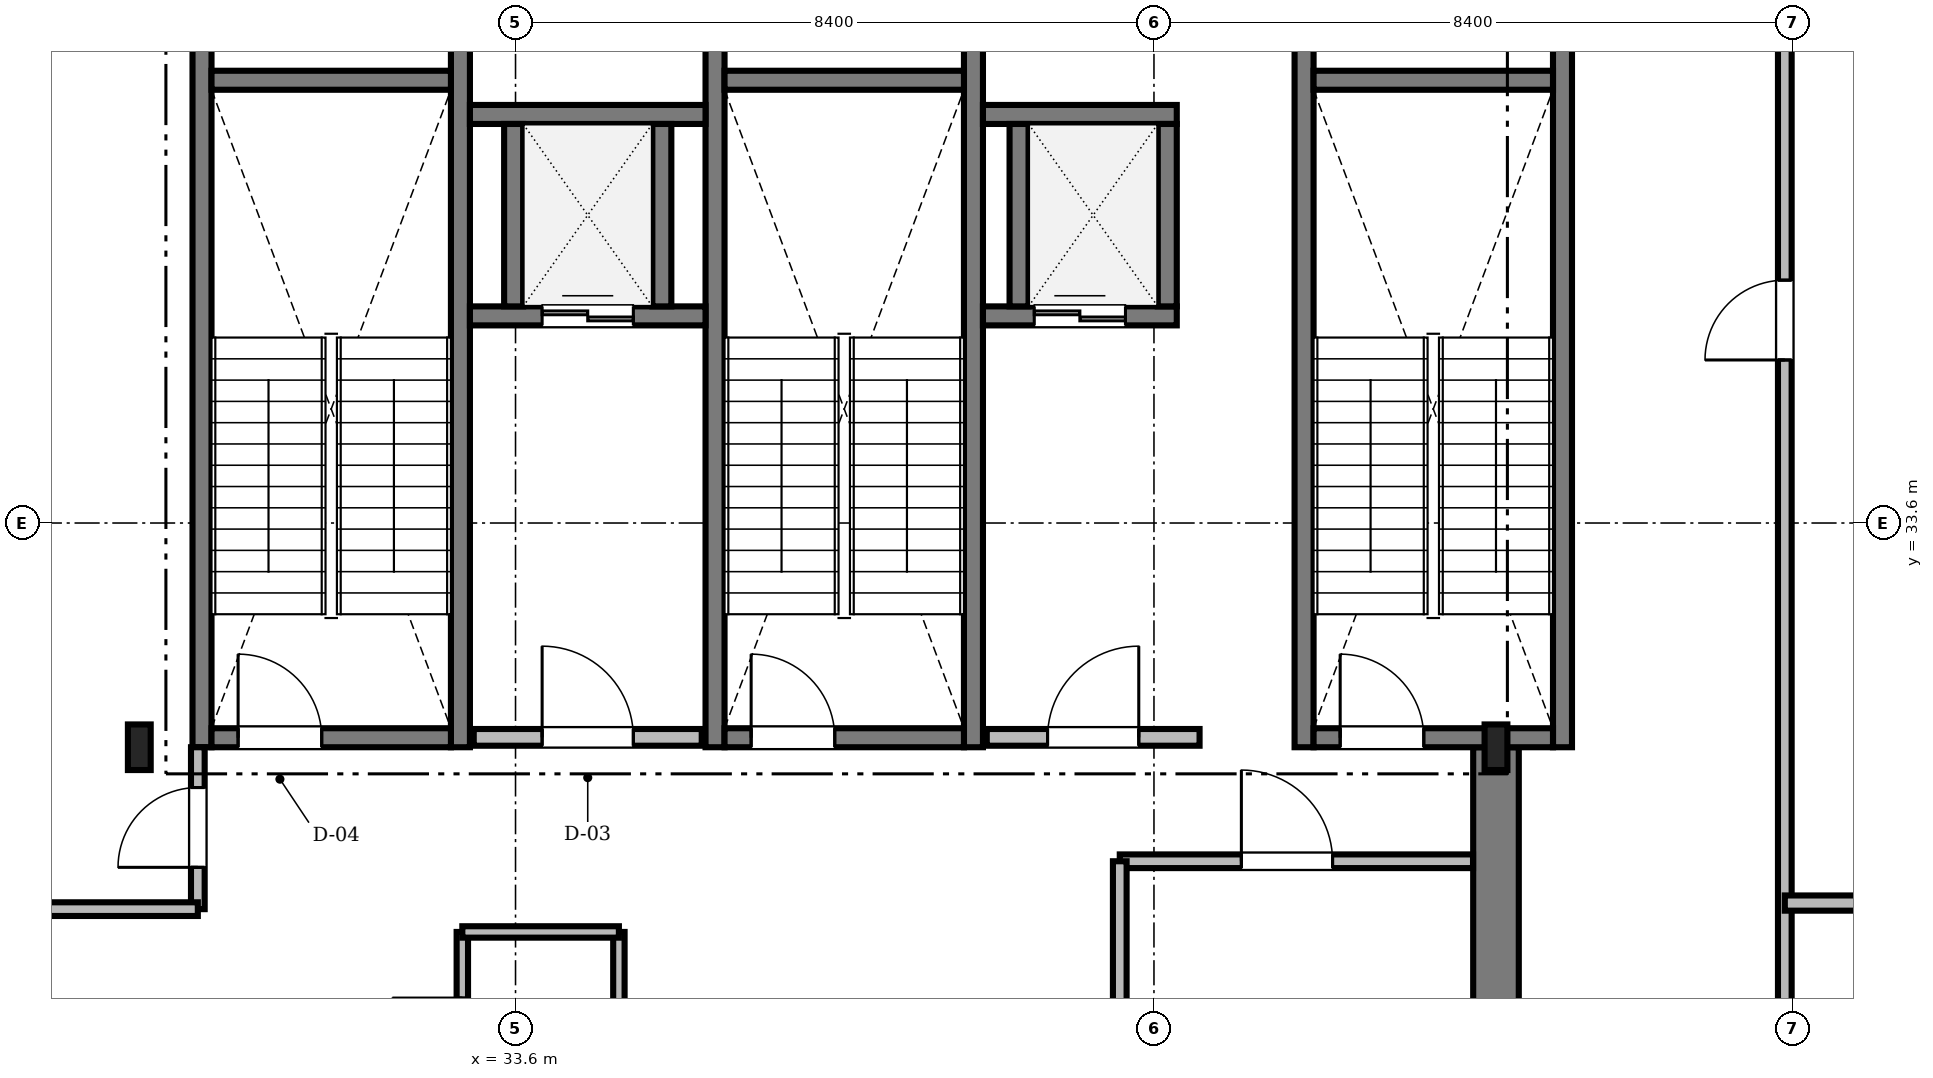
"""IFC4 building model, lengths in metres.
Left out: names, types, materials, properties, quantities, classifications, styles, units other than length and angle.
Written with IfcOpenShell. Run it as: python <this file> out.ifc"""

import sys

from ifc_helpers import new_model, si_unit, direction, frame, frame_2d, origin, origin_2d, place, context, subcontext, project, spatial, rectangle, i_section, extrude, source, transform, mapped, element, fill, save


model = new_model("IFC4")
c1 = context("Model", 3, precision=1e-05, world=origin(), true_north=direction((0.0, 1.0)))
c2 = subcontext(c1, "Body", "Model", "MODEL_VIEW")
j1 = project(units=[si_unit("LENGTHUNIT", "METRE"), si_unit("PLANEANGLEUNIT", "RADIAN")], contexts=[c1])
p1 = place(None, origin())
s1 = spatial("IfcSite", under=j1, at=p1, CompositionType="ELEMENT")
p2 = place(p1, origin())
s2 = spatial("IfcBuilding", under=s1, at=p2, CompositionType="ELEMENT")
p3 = place(p2, frame((0.0, 0.0, 286.15)))
s3 = spatial("IfcBuildingStorey", under=s2, at=p3, CompositionType="ELEMENT", Elevation=286.15)
m1 = source(origin(), c2, "Body", "SweptSolid", [
    extrude(rectangle(XDim=13.15, YDim=0.6, at=frame_2d((6.575, 0.0))), origin(), (0.0, 0.0, 1.0), 4.7),
])
p4 = place(p3, frame((46.5, 17.5, 0.0), z_axis=(0.0, 0.0, 1.0), x_axis=(0.0, 1.0, 0.0)))
e1 = element("IfcWall", 1, at=p4, inside=s3, PredefinedType="SHEAR", context=c2, shape_type="MappedRepresentation", body=[
    mapped(m1, transform((0.0, 0.0, 0.0), scale=1.0)),
])
m2 = source(origin(), c2, "Body", "SweptSolid", [
    extrude(i_section(OverallWidth=0.3, OverallDepth=0.6, WebThickness=0.015, FlangeThickness=0.03, FilletRadius=0.027, at=origin_2d()), origin(), (0.0, 0.0, 1.0), 4.7),
])
for number, where, z_axis, x_axis in (
    (2, (28.65, 30.65, 0.0), (0.0, 0.0, 1.0), (1.0, 0.0, 0.0)),
    (3, (46.5, 30.65, 0.0), (0.0, 0.0, 1.0), (1.0, 0.0, 0.0)),
):
    element("IfcColumn", number, at=place(p3, frame(where, z_axis=z_axis, x_axis=x_axis)), inside=s3, PredefinedType="COLUMN", context=c2, shape_type="MappedRepresentation", body=[
        mapped(m2, transform((0.0, 0.0, 0.0), scale=1.0)),
    ])
m3 = source(origin(), c2, "Body", "SweptSolid", [
    extrude(rectangle(XDim=9.35, YDim=0.25, at=frame_2d((4.675, 0.0))), origin(), (0.0, 0.0, 1.0), 4.8),
])
for number, where, z_axis, x_axis in (
    (4, (29.475, 30.65, 0.0), (0.0, 0.0, 1.0), (0.0, 1.0, 0.0)),
    (5, (32.875, 30.65, 0.0), (0.0, 0.0, 1.0), (0.0, 1.0, 0.0)),
):
    element("IfcWall", number, at=place(p3, frame(where, z_axis=z_axis, x_axis=x_axis)), inside=s3, PredefinedType="SOLIDWALL", context=c2, shape_type="MappedRepresentation", body=[
        mapped(m3, transform((0.0, 0.0, 0.0), scale=1.0)),
    ])
m4 = source(origin(), c2, "Body", "SweptSolid", [
    extrude(rectangle(XDim=3.15, YDim=0.25, at=frame_2d((1.575, 0.0))), origin(), (0.0, 0.0, 1.0), 4.8),
])
p5 = place(p3, frame((29.6, 39.425, 0.0), z_axis=(0.0, 0.0, 1.0), x_axis=(1.0, 0.0, 0.0)))
e6 = element("IfcWall", 6, at=p5, inside=s3, PredefinedType="SOLIDWALL", context=c2, shape_type="MappedRepresentation", body=[
    mapped(m4, transform((0.0, 0.0, 0.0), scale=1.0)),
])
p6 = place(p3, frame((29.6, 30.775, 0.0), z_axis=(0.0, 0.0, 1.0), x_axis=(1.0, 0.0, 0.0)))
e7 = element("IfcWall", 7, at=p6, inside=s3, PredefinedType="SOLIDWALL", context=c2, shape_type="MappedRepresentation", body=[
    mapped(m4, transform((0.0, 0.0, 0.0), scale=1.0)),
])
m5 = source(origin(), c2, "Body", "SweptSolid", [
    extrude(rectangle(XDim=1.1, YDim=2.2, at=frame_2d((0.55, 1.1))), frame((0.0, 0.135, 0.0), z_axis=(0.0, -1.0, 0.0), x_axis=(1.0, 0.0, 0.0)), (0.0, 0.0, 1.0), 0.27),
])
p7 = place(p6, frame((0.35, 0.0, 0.0)))
e8 = element("IfcOpeningElement", 8, at=p7, cuts=e7, PredefinedType="OPENING", context=c2, shape_type="MappedRepresentation", body=[
    mapped(m5, transform((0.0, 0.0, 0.0), scale=1.0)),
])
for number, where, z_axis, x_axis in (
    (9, (36.225, 30.65, 0.0), (0.0, 0.0, 1.0), (0.0, 1.0, 0.0)),
    (10, (39.625, 30.65, 0.0), (0.0, 0.0, 1.0), (0.0, 1.0, 0.0)),
):
    element("IfcWall", number, at=place(p3, frame(where, z_axis=z_axis, x_axis=x_axis)), inside=s3, PredefinedType="SOLIDWALL", context=c2, shape_type="MappedRepresentation", body=[
        mapped(m3, transform((0.0, 0.0, 0.0), scale=1.0)),
    ])
p8 = place(p3, frame((36.35, 39.425, 0.0), z_axis=(0.0, 0.0, 1.0), x_axis=(1.0, 0.0, 0.0)))
e11 = element("IfcWall", 11, at=p8, inside=s3, PredefinedType="SOLIDWALL", context=c2, shape_type="MappedRepresentation", body=[
    mapped(m4, transform((0.0, 0.0, 0.0), scale=1.0)),
])
p9 = place(p3, frame((36.35, 30.775, 0.0), z_axis=(0.0, 0.0, 1.0), x_axis=(1.0, 0.0, 0.0)))
e12 = element("IfcWall", 12, at=p9, inside=s3, PredefinedType="SOLIDWALL", context=c2, shape_type="MappedRepresentation", body=[
    mapped(m4, transform((0.0, 0.0, 0.0), scale=1.0)),
])
p10 = place(p9, frame((0.35, 0.0, 0.0)))
e13 = element("IfcOpeningElement", 13, at=p10, cuts=e12, PredefinedType="OPENING", context=c2, shape_type="MappedRepresentation", body=[
    mapped(m5, transform((0.0, 0.0, 0.0), scale=1.0)),
])
for number, where, z_axis, x_axis in (
    (14, (43.975, 30.65, 0.0), (0.0, 0.0, 1.0), (0.0, 1.0, 0.0)),
    (15, (47.375, 30.65, 0.0), (0.0, 0.0, 1.0), (0.0, 1.0, 0.0)),
):
    element("IfcWall", number, at=place(p3, frame(where, z_axis=z_axis, x_axis=x_axis)), inside=s3, PredefinedType="SOLIDWALL", context=c2, shape_type="MappedRepresentation", body=[
        mapped(m3, transform((0.0, 0.0, 0.0), scale=1.0)),
    ])
p11 = place(p3, frame((44.1, 39.425, 0.0), z_axis=(0.0, 0.0, 1.0), x_axis=(1.0, 0.0, 0.0)))
e16 = element("IfcWall", 16, at=p11, inside=s3, PredefinedType="SOLIDWALL", context=c2, shape_type="MappedRepresentation", body=[
    mapped(m4, transform((0.0, 0.0, 0.0), scale=1.0)),
])
p12 = place(p3, frame((44.1, 30.775, 0.0), z_axis=(0.0, 0.0, 1.0), x_axis=(1.0, 0.0, 0.0)))
e17 = element("IfcWall", 17, at=p12, inside=s3, PredefinedType="SOLIDWALL", context=c2, shape_type="MappedRepresentation", body=[
    mapped(m4, transform((0.0, 0.0, 0.0), scale=1.0)),
])
p13 = place(p12, frame((0.35, 0.0, 0.0)))
e18 = element("IfcOpeningElement", 18, at=p13, cuts=e17, PredefinedType="OPENING", context=c2, shape_type="MappedRepresentation", body=[
    mapped(m5, transform((0.0, 0.0, 0.0), scale=1.0)),
])
m6 = source(origin(), c2, "Body", "SweptSolid", [
    extrude(rectangle(XDim=3.0, YDim=0.22, at=frame_2d((1.5, 0.0))), origin(), (0.0, 0.0, 1.0), 4.7),
])
p14 = place(p3, frame((33.05, 30.78, 0.0), z_axis=(0.0, 0.0, 1.0), x_axis=(1.0, 0.0, 0.0)))
e19 = element("IfcWall", 19, at=p14, inside=s3, PredefinedType="SOLIDWALL", context=c2, shape_type="MappedRepresentation", body=[
    mapped(m6, transform((0.0, 0.0, 0.0), scale=1.0)),
])
m7 = source(origin(), c2, "Body", "SweptSolid", [
    extrude(rectangle(XDim=1.2, YDim=2.2, at=frame_2d((0.6, 1.1))), frame((0.0, 0.12, 0.0), z_axis=(0.0, -1.0, 0.0), x_axis=(1.0, 0.0, 0.0)), (0.0, 0.0, 1.0), 0.24),
])
p15 = place(p14, frame((0.9, 0.0, 0.0)))
e20 = element("IfcOpeningElement", 20, at=p15, cuts=e19, PredefinedType="OPENING", context=c2, shape_type="MappedRepresentation", body=[
    mapped(m7, transform((0.0, 0.0, 0.0), scale=1.0)),
])
m8 = source(origin(), c2, "Body", "SweptSolid", [
    extrude(rectangle(XDim=2.8, YDim=0.22, at=frame_2d((1.4, 0.0))), origin(), (0.0, 0.0, 1.0), 4.7),
])
p16 = place(p3, frame((39.8, 30.78, 0.0), z_axis=(0.0, 0.0, 1.0), x_axis=(1.0, 0.0, 0.0)))
e21 = element("IfcWall", 21, at=p16, inside=s3, PredefinedType="SOLIDWALL", context=c2, shape_type="MappedRepresentation", body=[
    mapped(m8, transform((0.0, 0.0, 0.0), scale=1.0)),
])
p17 = place(p16, frame((0.8, 0.0, 0.0)))
e22 = element("IfcOpeningElement", 22, at=p17, cuts=e21, PredefinedType="OPENING", context=c2, shape_type="MappedRepresentation", body=[
    mapped(m7, transform((0.0, 0.0, 0.0), scale=1.0)),
])
m9 = source(origin(), c2, "Body", "SweptSolid", [
    extrude(rectangle(XDim=3.1, YDim=0.25, at=frame_2d((1.55, 0.0))), origin(), (0.0, 0.0, 1.0), 4.7),
])
p18 = place(p3, frame((33.0, 36.325, 0.0), z_axis=(0.0, 0.0, 1.0), x_axis=(1.0, 0.0, 0.0)))
e23 = element("IfcWall", 23, at=p18, inside=s3, PredefinedType="SOLIDWALL", context=c2, shape_type="MappedRepresentation", body=[
    mapped(m9, transform((0.0, 0.0, 0.0), scale=1.0)),
])
m10 = source(origin(), c2, "Body", "SweptSolid", [
    extrude(rectangle(XDim=1.2, YDim=2.25, at=frame_2d((0.6, 1.125))), frame((0.0, 0.135, 0.0), z_axis=(0.0, -1.0, 0.0), x_axis=(1.0, 0.0, 0.0)), (0.0, 0.0, 1.0), 0.27),
])
p19 = place(p18, frame((0.95, 0.0, 0.0)))
e24 = element("IfcOpeningElement", 24, at=p19, cuts=e23, PredefinedType="OPENING", context=c2, shape_type="MappedRepresentation", body=[
    mapped(m10, transform((0.0, 0.0, 0.0), scale=1.0)),
])
p20 = place(p3, frame((33.0, 38.975, 0.0), z_axis=(0.0, 0.0, 1.0), x_axis=(1.0, 0.0, 0.0)))
e25 = element("IfcWall", 25, at=p20, inside=s3, PredefinedType="SOLIDWALL", context=c2, shape_type="MappedRepresentation", body=[
    mapped(m9, transform((0.0, 0.0, 0.0), scale=1.0)),
])
m11 = source(origin(), c2, "Body", "SweptSolid", [
    extrude(rectangle(XDim=2.4, YDim=0.25, at=frame_2d((1.2, 0.0))), origin(), (0.0, 0.0, 1.0), 4.7),
])
for number, where, z_axis, x_axis in (
    (26, (33.575, 36.45, 0.0), (0.0, 0.0, 1.0), (0.0, 1.0, 0.0)),
    (27, (35.525, 36.45, 0.0), (0.0, 0.0, 1.0), (0.0, 1.0, 0.0)),
):
    element("IfcWall", number, at=place(p3, frame(where, z_axis=z_axis, x_axis=x_axis)), inside=s3, PredefinedType="SOLIDWALL", context=c2, shape_type="MappedRepresentation", body=[
        mapped(m11, transform((0.0, 0.0, 0.0), scale=1.0)),
    ])
m12 = source(origin(), c2, "Body", "SweptSolid", [
    extrude(rectangle(XDim=2.55, YDim=0.25, at=frame_2d((1.275, 0.0))), origin(), (0.0, 0.0, 1.0), 4.7),
])
p21 = place(p3, frame((39.75, 36.325, 0.0), z_axis=(0.0, 0.0, 1.0), x_axis=(1.0, 0.0, 0.0)))
e28 = element("IfcWall", 28, at=p21, inside=s3, PredefinedType="SOLIDWALL", context=c2, shape_type="MappedRepresentation", body=[
    mapped(m12, transform((0.0, 0.0, 0.0), scale=1.0)),
])
p22 = place(p21, frame((0.675, 0.0, 0.0)))
e29 = element("IfcOpeningElement", 29, at=p22, cuts=e28, PredefinedType="OPENING", context=c2, shape_type="MappedRepresentation", body=[
    mapped(m10, transform((0.0, 0.0, 0.0), scale=1.0)),
])
p23 = place(p3, frame((39.75, 38.975, 0.0), z_axis=(0.0, 0.0, 1.0), x_axis=(1.0, 0.0, 0.0)))
e30 = element("IfcWall", 30, at=p23, inside=s3, PredefinedType="SOLIDWALL", context=c2, shape_type="MappedRepresentation", body=[
    mapped(m12, transform((0.0, 0.0, 0.0), scale=1.0)),
])
for number, where, z_axis, x_axis in (
    (31, (40.225, 36.45, 0.0), (0.0, 0.0, 1.0), (0.0, 1.0, 0.0)),
    (32, (42.175, 36.45, 0.0), (0.0, 0.0, 1.0), (0.0, 1.0, 0.0)),
):
    element("IfcWall", number, at=place(p3, frame(where, z_axis=z_axis, x_axis=x_axis)), inside=s3, PredefinedType="SOLIDWALL", context=c2, shape_type="MappedRepresentation", body=[
        mapped(m11, transform((0.0, 0.0, 0.0), scale=1.0)),
    ])
m13 = source(origin(), c2, "Body", "SweptSolid", [
    extrude(rectangle(XDim=27.508, YDim=0.18, at=frame_2d((13.754, 0.0))), origin(), (0.0, 0.0, 1.0), 3.942),
])
p24 = place(p3, frame((50.3, 16.45, 0.0), z_axis=(0.0, 0.0, 1.0), x_axis=(0.0, 1.0, 0.0)))
e33 = element("IfcWall", 33, at=p24, inside=s3, PredefinedType="PARTITIONING", context=c2, shape_type="MappedRepresentation", body=[
    mapped(m13, transform((0.0, 0.0, 0.0), scale=1.0)),
])
m14 = source(origin(), c2, "Body", "SweptSolid", [
    extrude(rectangle(XDim=1.05, YDim=2.2, at=frame_2d((0.525, 1.1))), frame((0.0, 0.1, 0.0), z_axis=(0.0, -1.0, 0.0), x_axis=(1.0, 0.0, 0.0)), (0.0, 0.0, 1.0), 0.2),
])
p25 = place(p24, frame((5.58, 0.0, 0.0)))
e34 = element("IfcOpeningElement", 34, at=p25, cuts=e33, PredefinedType="OPENING", context=c2, shape_type="MappedRepresentation", body=[
    mapped(m14, transform((0.0, 0.0, 0.0), scale=1.0)),
])
p26 = place(p24, frame((19.295, 0.0, 0.0)))
e35 = element("IfcOpeningElement", 35, at=p26, cuts=e33, PredefinedType="OPENING", context=c2, shape_type="MappedRepresentation", body=[
    mapped(m14, transform((0.0, 0.0, 0.0), scale=1.0)),
])
m15 = source(origin(), c2, "Body", "SweptSolid", [
    extrude(rectangle(XDim=2.13, YDim=0.18, at=frame_2d((1.065, 0.0))), origin(), (0.0, 0.0, 1.0), 4.332),
])
p27 = place(p3, frame((29.42, 28.52, 0.0), z_axis=(0.0, 0.0, 1.0), x_axis=(0.0, 1.0, 0.0)))
e36 = element("IfcWall", 36, at=p27, inside=s3, PredefinedType="PARTITIONING", context=c2, shape_type="MappedRepresentation", body=[
    mapped(m15, transform((0.0, 0.0, 0.0), scale=1.0)),
])
p28 = place(p27, frame((0.55, 0.0, 0.0)))
e37 = element("IfcOpeningElement", 37, at=p28, cuts=e36, PredefinedType="OPENING", context=c2, shape_type="MappedRepresentation", body=[
    mapped(m14, transform((0.0, 0.0, 0.0), scale=1.0)),
])
m16 = source(origin(), c2, "Body", "SweptSolid", [
    extrude(rectangle(XDim=4.648, YDim=0.18, at=frame_2d((2.324, 0.0))), origin(), (0.0, 0.0, 1.0), 4.332),
])
p29 = place(p3, frame((41.55, 29.15, 0.0), z_axis=(0.0, 0.0, 1.0), x_axis=(1.0, 0.0, 0.0)))
e38 = element("IfcWall", 38, at=p29, inside=s3, PredefinedType="PARTITIONING", context=c2, shape_type="MappedRepresentation", body=[
    mapped(m16, transform((0.0, 0.0, 0.0), scale=1.0)),
])
m17 = source(origin(), c2, "Body", "SweptSolid", [
    extrude(rectangle(XDim=1.2, YDim=2.2, at=frame_2d((0.6, 1.1))), frame((0.0, 0.1, 0.0), z_axis=(0.0, -1.0, 0.0), x_axis=(1.0, 0.0, 0.0)), (0.0, 0.0, 1.0), 0.2),
])
p30 = place(p29, frame((1.6, 0.0, 0.0)))
e39 = element("IfcOpeningElement", 39, at=p30, cuts=e38, PredefinedType="OPENING", context=c2, shape_type="MappedRepresentation", body=[
    mapped(m17, transform((0.0, 0.0, 0.0), scale=1.0)),
])
m18 = source(origin(), c2, "Body", "SweptSolid", [
    extrude(rectangle(XDim=2.44, YDim=0.15, at=frame_2d((1.22, 0.0))), origin(), (0.0, 0.0, 1.0), 4.242),
])
p31 = place(p3, frame((32.9, 25.78, 0.0), z_axis=(0.0, 0.0, 1.0), x_axis=(0.0, 1.0, 0.0)))
e40 = element("IfcWall", 40, at=p31, inside=s3, PredefinedType="PARTITIONING", context=c2, shape_type="MappedRepresentation", body=[
    mapped(m18, transform((0.0, 0.0, 0.0), scale=1.0)),
])
m19 = source(origin(), c2, "Body", "SweptSolid", [
    extrude(rectangle(XDim=0.92, YDim=2.1, at=frame_2d((0.46, 1.05))), frame((0.0, 0.085, 0.0), z_axis=(0.0, -1.0, 0.0), x_axis=(1.0, 0.0, 0.0)), (0.0, 0.0, 1.0), 0.17),
])
p32 = place(p31, frame((0.65, 0.0, 0.0)))
e41 = element("IfcOpeningElement", 41, at=p32, cuts=e40, PredefinedType="OPENING", context=c2, shape_type="MappedRepresentation", body=[
    mapped(m19, transform((0.0, 0.0, 0.0), scale=1.0)),
])
m20 = source(origin(), c2, "Body", "SweptSolid", [
    extrude(rectangle(XDim=11.958, YDim=0.2, at=frame_2d((5.979, 0.0))), origin(), (0.0, 0.0, 1.0), 3.942),
])
p33 = place(p3, frame((50.3, 28.6, 0.0), z_axis=(0.0, 0.0, 1.0), x_axis=(1.0, 0.0, 0.0)))
e42 = element("IfcWall", 42, at=p33, inside=s3, PredefinedType="PARTITIONING", context=c2, shape_type="MappedRepresentation", body=[
    mapped(m20, transform((0.0, 0.0, 0.0), scale=1.0)),
])
m21 = source(origin(), c2, "Body", "SweptSolid", [
    extrude(rectangle(XDim=4.678, YDim=0.18, at=frame_2d((2.339, 0.0))), origin(), (0.0, 0.0, 1.0), 3.942),
])
p34 = place(p3, frame((24.742, 28.52, 0.0), z_axis=(0.0, 0.0, 1.0), x_axis=(1.0, 0.0, 0.0)))
e43 = element("IfcWall", 43, at=p34, inside=s3, PredefinedType="PARTITIONING", context=c2, shape_type="MappedRepresentation", body=[
    mapped(m21, transform((0.0, 0.0, 0.0), scale=1.0)),
])
p35 = place(p3, frame((34.96, 25.78, 0.0), z_axis=(0.0, 0.0, 1.0), x_axis=(0.0, 1.0, 0.0)))
e44 = element("IfcWall", 44, at=p35, inside=s3, PredefinedType="PARTITIONING", context=c2, shape_type="MappedRepresentation", body=[
    mapped(m18, transform((0.0, 0.0, 0.0), scale=1.0)),
])
m22 = source(origin(), c2, "Body", "SweptSolid", [
    extrude(rectangle(XDim=2.35, YDim=0.18, at=frame_2d((1.175, 0.0))), origin(), (0.0, 0.0, 1.0), 4.332),
])
p36 = place(p3, frame((41.55, 26.8, 0.0), z_axis=(0.0, 0.0, 1.0), x_axis=(0.0, 1.0, 0.0)))
e45 = element("IfcWall", 45, at=p36, inside=s3, PredefinedType="PARTITIONING", context=c2, shape_type="MappedRepresentation", body=[
    mapped(m22, transform((0.0, 0.0, 0.0), scale=1.0)),
])
m23 = source(origin(), c2, "Body", "SweptSolid", [
    extrude(rectangle(XDim=2.06, YDim=0.15, at=frame_2d((1.03, 0.0))), origin(), (0.0, 0.0, 1.0), 4.332),
])
p37 = place(p3, frame((32.9, 28.22, 0.0), z_axis=(0.0, 0.0, 1.0), x_axis=(1.0, 0.0, 0.0)))
e46 = element("IfcWall", 46, at=p37, inside=s3, PredefinedType="PARTITIONING", context=c2, shape_type="MappedRepresentation", body=[
    mapped(m23, transform((0.0, 0.0, 0.0), scale=1.0)),
])
m24 = source(origin(), c2, "Body", "SweptSolid", [
    extrude(rectangle(XDim=1.1, YDim=2.2, at=frame_2d((0.55, 1.1))), frame((0.0, 0.025, 0.0), z_axis=(0.0, -1.0, 0.0), x_axis=(1.0, 0.0, 0.0)), (0.0, 0.0, 1.0), 0.05),
])
p38 = place(p7, origin())
e47 = element("IfcDoor", 47, at=p38, inside=s3, OperationType="SINGLE_SWING_LEFT", PredefinedType="DOOR", context=c2, shape_type="MappedRepresentation", body=[
    mapped(m24, transform((0.0, 0.0, 0.0), scale=1.0)),
])
fill(e8, e47)
p39 = place(p10, origin())
e48 = element("IfcDoor", 48, at=p39, inside=s3, OperationType="SINGLE_SWING_LEFT", PredefinedType="DOOR", context=c2, shape_type="MappedRepresentation", body=[
    mapped(m24, transform((0.0, 0.0, 0.0), scale=1.0)),
])
fill(e13, e48)
p40 = place(p13, origin())
e49 = element("IfcDoor", 49, at=p40, inside=s3, OperationType="SINGLE_SWING_LEFT", PredefinedType="DOOR", context=c2, shape_type="MappedRepresentation", body=[
    mapped(m24, transform((0.0, 0.0, 0.0), scale=1.0)),
])
fill(e18, e49)
m25 = source(origin(), c2, "Body", "SweptSolid", [
    extrude(rectangle(XDim=1.2, YDim=2.2, at=frame_2d((0.6, 1.1))), frame((0.0, 0.025, 0.0), z_axis=(0.0, -1.0, 0.0), x_axis=(1.0, 0.0, 0.0)), (0.0, 0.0, 1.0), 0.05),
])
p41 = place(p15, origin())
e50 = element("IfcDoor", 50, at=p41, inside=s3, OperationType="SINGLE_SWING_LEFT", PredefinedType="DOOR", context=c2, shape_type="MappedRepresentation", body=[
    mapped(m25, transform((0.0, 0.0, 0.0), scale=1.0)),
])
fill(e20, e50)
p42 = place(p17, origin())
e51 = element("IfcDoor", 51, at=p42, inside=s3, OperationType="SINGLE_SWING_RIGHT", PredefinedType="DOOR", context=c2, shape_type="MappedRepresentation", body=[
    mapped(m25, transform((0.0, 0.0, 0.0), scale=1.0)),
])
fill(e22, e51)
m26 = source(origin(), c2, "Body", "SweptSolid", [
    extrude(rectangle(XDim=1.2, YDim=2.25, at=frame_2d((0.6, 1.125))), frame((0.0, 0.025, 0.0), z_axis=(0.0, -1.0, 0.0), x_axis=(1.0, 0.0, 0.0)), (0.0, 0.0, 1.0), 0.05),
])
p43 = place(p19, origin())
e52 = element("IfcDoor", 52, at=p43, inside=s3, OperationType="DOUBLE_DOOR_SLIDING", PredefinedType="DOOR", context=c2, shape_type="MappedRepresentation", body=[
    mapped(m26, transform((0.0, 0.0, 0.0), scale=1.0)),
])
fill(e24, e52)
p44 = place(p22, origin())
e53 = element("IfcDoor", 53, at=p44, inside=s3, OperationType="DOUBLE_DOOR_SLIDING", PredefinedType="DOOR", context=c2, shape_type="MappedRepresentation", body=[
    mapped(m26, transform((0.0, 0.0, 0.0), scale=1.0)),
])
fill(e29, e53)
m27 = source(origin(), c2, "Body", "SweptSolid", [
    extrude(rectangle(XDim=1.05, YDim=2.2, at=frame_2d((0.525, 1.1))), frame((0.0, 0.025, 0.0), z_axis=(0.0, -1.0, 0.0), x_axis=(1.0, 0.0, 0.0)), (0.0, 0.0, 1.0), 0.05),
])
p45 = place(p26, origin())
e54 = element("IfcDoor", 54, at=p45, inside=s3, OperationType="SINGLE_SWING_LEFT", PredefinedType="DOOR", context=c2, shape_type="MappedRepresentation", body=[
    mapped(m27, transform((0.0, 0.0, 0.0), scale=1.0)),
])
fill(e35, e54)
p46 = place(p28, origin())
e55 = element("IfcDoor", 55, at=p46, inside=s3, OperationType="SINGLE_SWING_LEFT", PredefinedType="DOOR", context=c2, shape_type="MappedRepresentation", body=[
    mapped(m27, transform((0.0, 0.0, 0.0), scale=1.0)),
])
fill(e37, e55)
p47 = place(p30, origin())
e56 = element("IfcDoor", 56, at=p47, inside=s3, OperationType="SINGLE_SWING_LEFT", PredefinedType="DOOR", context=c2, shape_type="MappedRepresentation", body=[
    mapped(m25, transform((0.0, 0.0, 0.0), scale=1.0)),
])
fill(e39, e56)
save(model, sys.argv[1])
